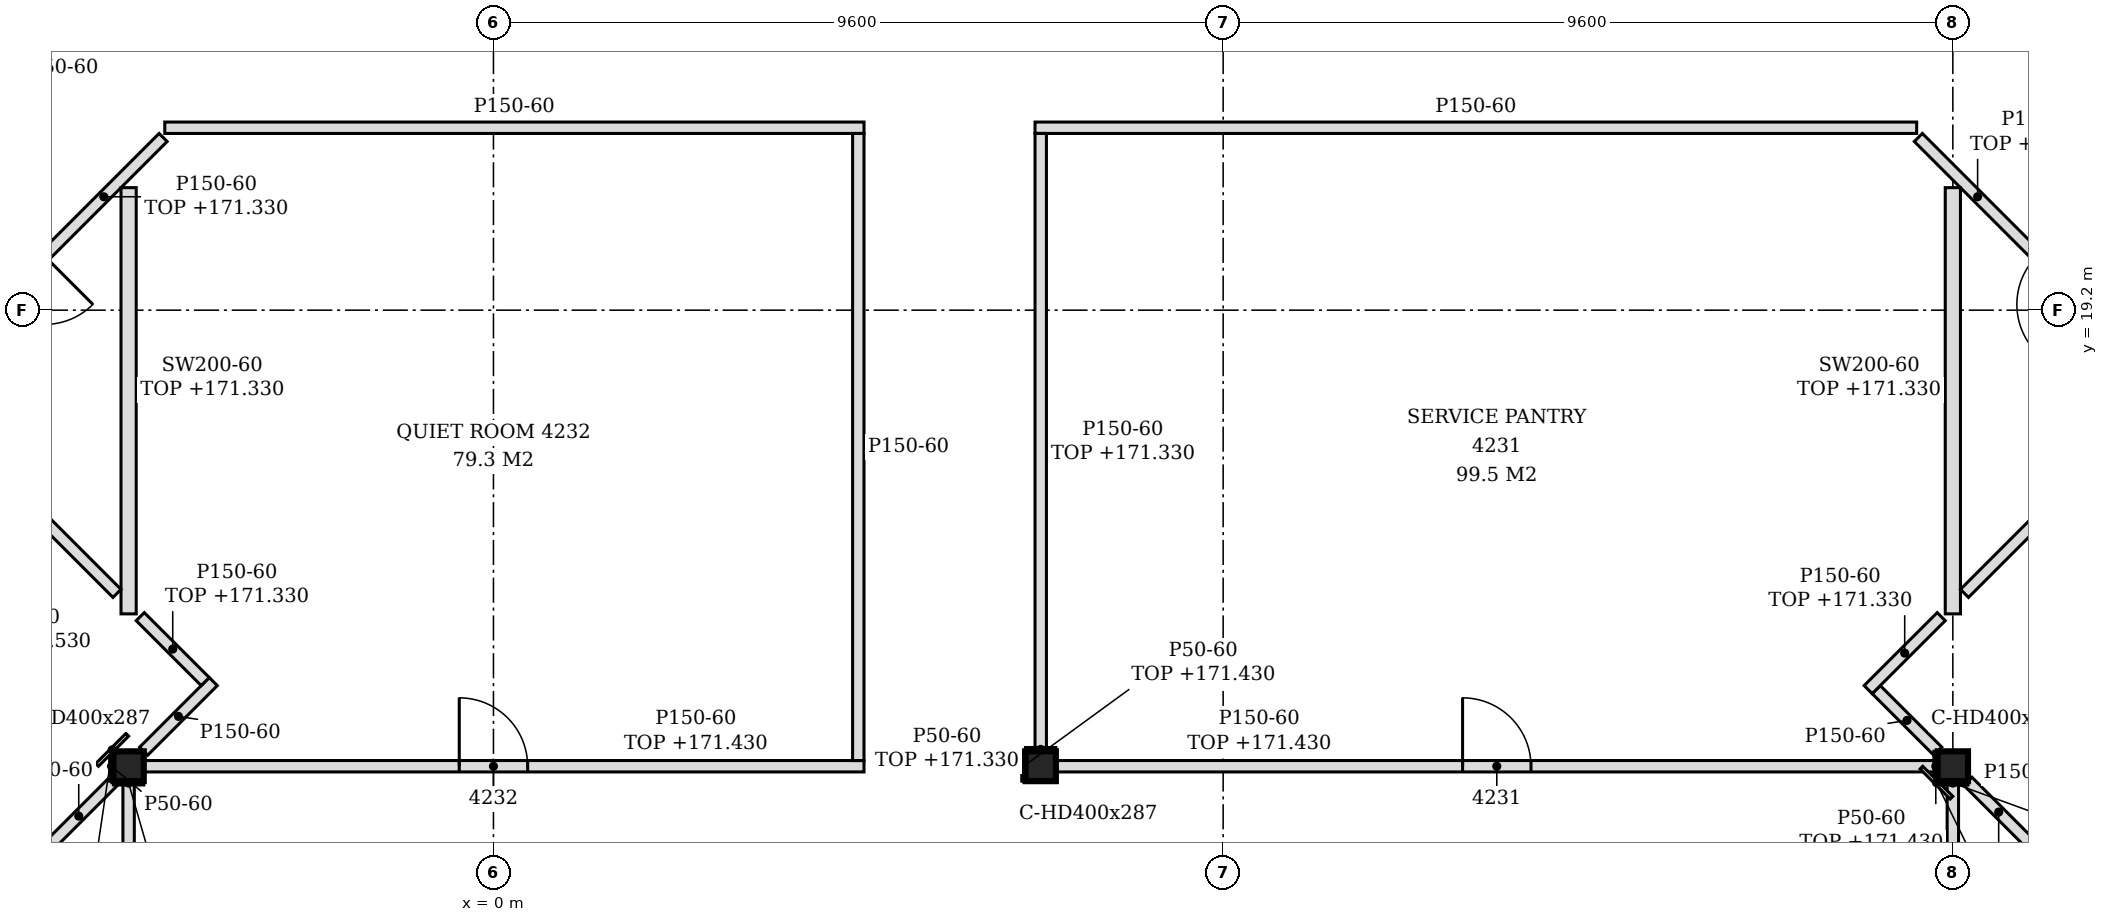
"""IFC4 building model, lengths in metres.
Left out: names, types, materials, properties, quantities, classifications, styles, units other than length and angle.
Written with IfcOpenShell. Run it as: python <this file> out.ifc"""

import sys

from ifc_helpers import new_model, si_unit, direction, frame, frame_2d, origin, origin_2d, place, context, subcontext, project, spatial, polyline, rectangle, i_section, outline, extrude, element, fill, save


model = new_model("IFC4")
c1 = context("Model", 3, precision=1e-05, world=origin(), true_north=direction((0.0, 1.0)))
c2 = subcontext(c1, "Body", "Model", "MODEL_VIEW")
j1 = project(units=[si_unit("LENGTHUNIT", "METRE"), si_unit("PLANEANGLEUNIT", "RADIAN")], contexts=[c1])
p1 = place(None, origin())
s1 = spatial("IfcSite", under=j1, at=p1, CompositionType="ELEMENT")
p2 = place(p1, origin())
s2 = spatial("IfcBuilding", under=s1, at=p2, CompositionType="ELEMENT")
p3 = place(p2, frame((0.0, 0.0, 168.6)))
s3 = spatial("IfcBuildingStorey", under=s2, at=p3, CompositionType="ELEMENT", Elevation=168.6)
for number, where, z_axis, x_axis in (
    (1, (-4.8, 13.2, -0.15), (0.0, 0.0, 1.0), (1.0, 0.0, 0.0)),
    (2, (7.2, 13.2, -0.15), (0.0, 0.0, 1.0), (1.0, 0.0, 0.0)),
    (3, (19.2, 13.2, -0.15), (0.0, 0.0, 1.0), (1.0, 0.0, 0.0)),
):
    element("IfcColumn", number, at=place(p3, frame(where, z_axis=z_axis, x_axis=x_axis)), inside=s3, PredefinedType="COLUMN", context=c2, shape_type="SweptSolid", body=[
        extrude(i_section(OverallWidth=0.399, OverallDepth=0.393, WebThickness=0.023, FlangeThickness=0.037, FilletRadius=0.015, at=origin_2d()), origin(), (0.0, 0.0, 1.0), 3.6),
    ])
p4 = place(p3, frame((-4.8, 2.596, 0.0), z_axis=(0.0, 0.0, 1.0), x_axis=(0.0, 1.0, 0.0)))
e4 = element("IfcWall", 4, at=p4, inside=s3, PredefinedType="PARTITIONING", context=c2, shape_type="SweptSolid", body=[
    extrude(rectangle(XDim=10.407, YDim=0.15, at=frame_2d((5.204, 0.0))), origin(), (0.0, 0.0, 1.0), 2.83),
])
p5 = place(p4, frame((4.303, 0.0, 0.0)))
e5 = element("IfcOpeningElement", 5, at=p5, cuts=e4, PredefinedType="OPENING", context=c2, shape_type="SweptSolid", body=[
    extrude(rectangle(XDim=0.9, YDim=2.1, at=frame_2d((0.45, 1.05))), frame((0.0, 0.085, 0.0), z_axis=(0.0, -1.0, 0.0), x_axis=(1.0, 0.0, 0.0)), (0.0, 0.0, 1.0), 0.17),
])
p6 = place(p3, frame((19.2, 2.596, 0.0), z_axis=(0.0, 0.0, 1.0), x_axis=(0.0, 1.0, 0.0)))
e6 = element("IfcWall", 6, at=p6, inside=s3, PredefinedType="PARTITIONING", context=c2, shape_type="SweptSolid", body=[
    extrude(rectangle(XDim=10.407, YDim=0.15, at=frame_2d((5.204, 0.0))), origin(), (0.0, 0.0, 1.0), 2.83),
])
p7 = place(p6, frame((2.954, 0.0, 0.0)))
e7 = element("IfcOpeningElement", 7, at=p7, cuts=e6, PredefinedType="OPENING", context=c2, shape_type="SweptSolid", body=[
    extrude(rectangle(XDim=0.9, YDim=2.1, at=frame_2d((0.45, 1.05))), frame((0.0, 0.085, 0.0), z_axis=(0.0, -1.0, 0.0), x_axis=(1.0, 0.0, 0.0)), (0.0, 0.0, 1.0), 0.17),
])
p8 = place(p3, frame((-5.914, 12.086, 0.0), z_axis=(0.0, 0.0, 1.0), x_axis=(0.707106781187, 0.707106781187, 0.0)))
e8 = element("IfcWall", 8, at=p8, inside=s3, PredefinedType="PARTITIONING", context=c2, shape_type="SweptSolid", body=[
    extrude(rectangle(XDim=1.295, YDim=0.15, at=frame_2d((0.648, 0.0))), origin(), (0.0, 0.0, 1.0), 3.45),
])
p9 = place(p3, frame((20.208, 12.086, 0.0), z_axis=(0.0, 0.0, 1.0), x_axis=(0.706747296365, 0.707466083343, 0.0)))
e9 = element("IfcWall", 9, at=p9, inside=s3, PredefinedType="PARTITIONING", context=c2, shape_type="SweptSolid", body=[
    extrude(rectangle(XDim=1.359, YDim=0.15, at=frame_2d((0.679, 0.0))), origin(), (0.0, 0.0, 1.0), 3.45),
])
p10 = place(p3, frame((20.208, 12.192, 0.0), z_axis=(0.0, 0.0, 1.0), x_axis=(-0.70721334539, 0.707000200921, 0.0)))
e10 = element("IfcWall", 10, at=p10, inside=s3, PredefinedType="PARTITIONING", context=c2, shape_type="SweptSolid", body=[
    extrude(rectangle(XDim=1.146, YDim=0.15, at=frame_2d((0.573, 0.0))), origin(), (0.0, 0.0, 1.0), 3.45),
])
p11 = place(p3, frame((-4.601, 13.2, 0.0), z_axis=(0.0, 0.0, 1.0), x_axis=(1.0, 0.0, 0.0)))
e11 = element("IfcWall", 11, at=p11, inside=s3, PredefinedType="PARTITIONING", context=c2, shape_type="SweptSolid", body=[
    extrude(rectangle(XDim=9.476, YDim=0.15, at=frame_2d((4.738, 0.0))), origin(), (0.0, 0.0, 1.0), 2.83),
])
p12 = place(p11, frame((4.151, 0.0, 0.0)))
e12 = element("IfcOpeningElement", 12, at=p12, cuts=e11, PredefinedType="OPENING", context=c2, shape_type="SweptSolid", body=[
    extrude(rectangle(XDim=0.9, YDim=2.1, at=frame_2d((0.45, 1.05))), frame((0.0, 0.085, 0.0), z_axis=(0.0, -1.0, 0.0), x_axis=(1.0, 0.0, 0.0)), (0.0, 0.0, 1.0), 0.17),
])
p13 = place(p3, frame((7.399, 13.2, 0.0), z_axis=(0.0, 0.0, 1.0), x_axis=(1.0, 0.0, 0.0)))
e13 = element("IfcWall", 13, at=p13, inside=s3, PredefinedType="PARTITIONING", context=c2, shape_type="SweptSolid", body=[
    extrude(rectangle(XDim=11.601, YDim=0.15, at=frame_2d((5.801, 0.0))), origin(), (0.0, 0.0, 1.0), 2.83),
])
p14 = place(p13, frame((5.351, 0.0, 0.0)))
e14 = element("IfcOpeningElement", 14, at=p14, cuts=e13, PredefinedType="OPENING", context=c2, shape_type="SweptSolid", body=[
    extrude(rectangle(XDim=0.9, YDim=2.1, at=frame_2d((0.45, 1.05))), frame((0.0, 0.085, 0.0), z_axis=(0.0, -1.0, 0.0), x_axis=(1.0, 0.0, 0.0)), (0.0, 0.0, 1.0), 0.17),
])
p15 = place(p3, frame((4.8, 13.275, 0.0), z_axis=(0.0, 0.0, 1.0), x_axis=(0.0, 1.0, 0.0)))
e15 = element("IfcWall", 15, at=p15, inside=s3, PredefinedType="PARTITIONING", context=c2, shape_type="SweptSolid", body=[
    extrude(outline(polyline([(0.0, 0.0), (8.25, 0.0), (8.25, 3.45), (6.03, 3.45), (6.028, 2.88), (5.82, 2.88), (5.818, 3.45), (0.075, 3.45), (0.073, 2.83), (0.0, 2.83), (0.0, 0.0)])), frame((0.0, 0.075, 0.0), z_axis=(0.0, -1.0, 0.0), x_axis=(1.0, 0.0, 0.0)), (0.0, 0.0, 1.0), 0.15),
])
p16 = place(p3, frame((-4.602, 13.398, 0.0), z_axis=(0.0, 0.0, 1.0), x_axis=(0.707106781187, 0.707106781187, 0.0)))
e16 = element("IfcWall", 16, at=p16, inside=s3, PredefinedType="PARTITIONING", context=c2, shape_type="SweptSolid", body=[
    extrude(rectangle(XDim=1.296, YDim=0.15, at=frame_2d((0.648, 0.0))), origin(), (0.0, 0.0, 1.0), 3.45),
])
p17 = place(p3, frame((7.2, 13.396, 0.0), z_axis=(0.0, 0.0, 1.0), x_axis=(0.0, 1.0, 0.0)))
e17 = element("IfcWall", 17, at=p17, inside=s3, PredefinedType="PARTITIONING", context=c2, shape_type="SweptSolid", body=[
    extrude(rectangle(XDim=8.128, YDim=0.15, at=frame_2d((4.064, 0.0))), origin(), (0.0, 0.0, 1.0), 2.73),
])
p18 = place(p3, frame((19.002, 13.398, 0.0), z_axis=(0.0, 0.0, 1.0), x_axis=(-0.707000200921, 0.70721334539, 0.0)))
e18 = element("IfcWall", 18, at=p18, inside=s3, PredefinedType="PARTITIONING", context=c2, shape_type="SweptSolid", body=[
    extrude(rectangle(XDim=1.146, YDim=0.15, at=frame_2d((0.573, 0.0))), origin(), (0.0, 0.0, 1.0), 3.45),
])
p19 = place(p3, frame((18.086, 14.208, 0.0), z_axis=(0.0, 0.0, 1.0), x_axis=(0.707466083343, 0.706747296365, 0.0)))
e19 = element("IfcWall", 19, at=p19, inside=s3, PredefinedType="PARTITIONING", context=c2, shape_type="SweptSolid", body=[
    extrude(rectangle(XDim=1.359, YDim=0.15, at=frame_2d((0.679, 0.0))), origin(), (0.0, 0.0, 1.0), 2.73),
])
p20 = place(p3, frame((-3.792, 14.314, 0.0), z_axis=(0.0, 0.0, 1.0), x_axis=(-0.707409718716, 0.706803713817, 0.0)))
e20 = element("IfcWall", 20, at=p20, inside=s3, PredefinedType="PARTITIONING", context=c2, shape_type="SweptSolid", body=[
    extrude(rectangle(XDim=1.208, YDim=0.15, at=frame_2d((0.604, 0.0))), origin(), (0.0, 0.0, 1.0), 2.73),
])
for number, where, z_axis, x_axis in (
    (21, (-4.8, 15.205, 0.0), (0.0, 0.0, 1.0), (0.0, 1.0, 0.0)),
    (22, (19.2, 15.205, 0.0), (0.0, 0.0, 1.0), (0.0, 1.0, 0.0)),
):
    element("IfcWall", number, at=place(p3, frame(where, z_axis=z_axis, x_axis=x_axis)), inside=s3, PredefinedType="PARTITIONING", context=c2, shape_type="SweptSolid", body=[
        extrude(rectangle(XDim=5.607, YDim=0.2, at=frame_2d((2.804, 0.0))), origin(), (0.0, 0.0, 1.0), 2.73),
    ])
p21 = place(p3, frame((-4.953, 15.474, 0.0), z_axis=(0.0, 0.0, 1.0), x_axis=(-0.707008778354, 0.707204770438, 0.0)))
e23 = element("IfcWall", 23, at=p21, inside=s3, PredefinedType="PARTITIONING", context=c2, shape_type="SweptSolid", body=[
    extrude(rectangle(XDim=3.737, YDim=0.15, at=frame_2d((1.869, 0.0))), origin(), (0.0, 0.0, 1.0), 2.73),
])
p22 = place(p3, frame((19.353, 15.474, 0.0), z_axis=(0.0, 0.0, 1.0), x_axis=(0.707012556818, 0.707200993001, 0.0)))
e24 = element("IfcWall", 24, at=p22, inside=s3, PredefinedType="PARTITIONING", context=c2, shape_type="SweptSolid", body=[
    extrude(rectangle(XDim=3.887, YDim=0.15, at=frame_2d((1.943, 0.0))), origin(), (0.0, 0.0, 1.0), 2.73),
])
p23 = place(p3, frame((-7.701, 18.117, 0.0), z_axis=(0.0, 0.0, 1.0), x_axis=(0.707106781187, 0.707106781187, 0.0)))
e25 = element("IfcWall", 25, at=p23, inside=s3, PredefinedType="PARTITIONING", context=c2, shape_type="SweptSolid", body=[
    extrude(rectangle(XDim=4.745, YDim=0.15, at=frame_2d((2.372, 0.0))), origin(), (0.0, 0.0, 1.0), 2.73),
])
p24 = place(p23, frame((1.639, 0.0, 0.0)))
e26 = element("IfcOpeningElement", 26, at=p24, cuts=e25, PredefinedType="OPENING", context=c2, shape_type="SweptSolid", body=[
    extrude(rectangle(XDim=0.9, YDim=2.1, at=frame_2d((0.45, 1.05))), frame((0.0, 0.085, 0.0), z_axis=(0.0, -1.0, 0.0), x_axis=(1.0, 0.0, 0.0)), (0.0, 0.0, 1.0), 0.17),
])
p25 = place(p3, frame((21.995, 18.223, 0.0), z_axis=(0.0, 0.0, 1.0), x_axis=(-0.707106781187, 0.707106781187, 0.0)))
e27 = element("IfcWall", 27, at=p25, inside=s3, PredefinedType="PARTITIONING", context=c2, shape_type="SweptSolid", body=[
    extrude(rectangle(XDim=4.595, YDim=0.15, at=frame_2d((2.297, 0.0))), origin(), (0.0, 0.0, 1.0), 2.73),
])
p26 = place(p25, frame((1.489, 0.0, 0.0)))
e28 = element("IfcOpeningElement", 28, at=p26, cuts=e27, PredefinedType="OPENING", context=c2, shape_type="SweptSolid", body=[
    extrude(rectangle(XDim=0.9, YDim=2.1, at=frame_2d((0.45, 1.05))), frame((0.0, 0.085, 0.0), z_axis=(0.0, -1.0, 0.0), x_axis=(1.0, 0.0, 0.0)), (0.0, 0.0, 1.0), 0.17),
])
p27 = place(p3, frame((-8.623, 20.589, 0.0), z_axis=(0.0, 0.0, 1.0), x_axis=(0.707106781187, 0.707106781187, 0.0)))
e29 = element("IfcWall", 29, at=p27, inside=s3, PredefinedType="PARTITIONING", context=c2, shape_type="SweptSolid", body=[
    extrude(rectangle(XDim=4.643, YDim=0.15, at=frame_2d((2.322, 0.0))), origin(), (0.0, 0.0, 1.0), 3.45),
])
p28 = place(p27, frame((1.085, 0.0, 0.0)))
e30 = element("IfcOpeningElement", 30, at=p28, cuts=e29, PredefinedType="OPENING", context=c2, shape_type="SweptSolid", body=[
    extrude(rectangle(XDim=0.9, YDim=2.1, at=frame_2d((0.45, 1.05))), frame((0.0, 0.085, 0.0), z_axis=(0.0, -1.0, 0.0), x_axis=(1.0, 0.0, 0.0)), (0.0, 0.0, 1.0), 0.17),
])
p29 = place(p3, frame((23.023, 20.589, 0.0), z_axis=(0.0, 0.0, 1.0), x_axis=(-0.707106781187, 0.707106781187, 0.0)))
e31 = element("IfcWall", 31, at=p29, inside=s3, PredefinedType="PARTITIONING", context=c2, shape_type="SweptSolid", body=[
    extrude(rectangle(XDim=4.643, YDim=0.15, at=frame_2d((2.322, 0.0))), origin(), (0.0, 0.0, 1.0), 3.45),
])
p30 = place(p3, frame((-4.324, 21.6, 0.0), z_axis=(0.0, 0.0, 1.0), x_axis=(1.0, 0.0, 0.0)))
e32 = element("IfcWall", 32, at=p30, inside=s3, PredefinedType="PARTITIONING", context=c2, shape_type="SweptSolid", body=[
    extrude(rectangle(XDim=9.199, YDim=0.15, at=frame_2d((4.6, 0.0))), origin(), (0.0, 0.0, 1.0), 3.45),
])
p31 = place(p3, frame((7.125, 21.6, 0.0), z_axis=(0.0, 0.0, 1.0), x_axis=(1.0, 0.0, 0.0)))
e33 = element("IfcWall", 33, at=p31, inside=s3, PredefinedType="PARTITIONING", context=c2, shape_type="SweptSolid", body=[
    extrude(outline(polyline([(0.0, 0.0), (11.599, 0.0), (11.599, 3.45), (0.225, 3.45), (0.223, 2.73), (0.0, 2.73), (0.0, 0.0)])), frame((0.0, 0.075, 0.0), z_axis=(0.0, -1.0, 0.0), x_axis=(1.0, 0.0, 0.0)), (0.0, 0.0, 1.0), 0.15),
])
p32 = place(p3, frame((-5.024, 13.003, 0.0), z_axis=(0.0, 0.0, 1.0), x_axis=(0.0, 1.0, 0.0)))
e34 = element("IfcWall", 34, at=p32, inside=s3, PredefinedType="PARTITIONING", context=c2, shape_type="SweptSolid", body=[
    extrude(rectangle(XDim=0.393, YDim=0.05, at=frame_2d((0.197, 0.0))), origin(), (0.0, 0.0, 1.0), 3.45),
])
p33 = place(p3, frame((18.976, 13.003, 0.0), z_axis=(0.0, 0.0, 1.0), x_axis=(0.0, 1.0, 0.0)))
e35 = element("IfcWall", 35, at=p33, inside=s3, PredefinedType="PARTITIONING", context=c2, shape_type="SweptSolid", body=[
    extrude(rectangle(XDim=0.393, YDim=0.05, at=frame_2d((0.197, 0.0))), origin(), (0.0, 0.0, 1.0), 2.83),
])
p34 = place(p3, frame((-5.214, 13.218, 0.0), z_axis=(0.0, 0.0, 1.0), x_axis=(0.707106781187, 0.707106781187, 0.0)))
e36 = element("IfcWall", 36, at=p34, inside=s3, PredefinedType="PARTITIONING", context=c2, shape_type="SweptSolid", body=[
    extrude(rectangle(XDim=0.56, YDim=0.05, at=frame_2d((0.28, 0.0))), origin(), (0.0, 0.0, 1.0), 2.73),
])
p35 = place(p3, frame((19.182, 12.786, 0.0), z_axis=(0.0, 0.0, 1.0), x_axis=(-0.707106781187, 0.707106781187, 0.0)))
e37 = element("IfcWall", 37, at=p35, inside=s3, PredefinedType="PARTITIONING", context=c2, shape_type="SweptSolid", body=[
    extrude(rectangle(XDim=0.56, YDim=0.05, at=frame_2d((0.28, 0.0))), origin(), (0.0, 0.0, 1.0), 2.83),
])
p36 = place(p3, frame((-5.0, 12.979, 0.0), z_axis=(0.0, 0.0, 1.0), x_axis=(1.0, 0.0, 0.0)))
e38 = element("IfcWall", 38, at=p36, inside=s3, PredefinedType="PARTITIONING", context=c2, shape_type="SweptSolid", body=[
    extrude(rectangle(XDim=0.399, YDim=0.05, at=frame_2d((0.199, 0.0))), origin(), (0.0, 0.0, 1.0), 2.83),
])
p37 = place(p3, frame((7.0, 13.421, 0.0), z_axis=(0.0, 0.0, 1.0), x_axis=(1.0, 0.0, 0.0)))
e39 = element("IfcWall", 39, at=p37, inside=s3, PredefinedType="PARTITIONING", context=c2, shape_type="SweptSolid", body=[
    extrude(rectangle(XDim=0.399, YDim=0.05, at=frame_2d((0.199, 0.0))), origin(), (0.0, 0.0, 1.0), 2.73),
])
p38 = place(p3, frame((19.0, 12.979, 0.0), z_axis=(0.0, 0.0, 1.0), x_axis=(1.0, 0.0, 0.0)))
e40 = element("IfcWall", 40, at=p38, inside=s3, PredefinedType="PARTITIONING", context=c2, shape_type="SweptSolid", body=[
    extrude(rectangle(XDim=0.399, YDim=0.05, at=frame_2d((0.199, 0.0))), origin(), (0.0, 0.0, 1.0), 2.83),
])
p39 = place(p3, frame((6.976, 13.003, 0.0), z_axis=(0.0, 0.0, 1.0), x_axis=(0.0, 1.0, 0.0)))
e41 = element("IfcWall", 41, at=p39, inside=s3, PredefinedType="PARTITIONING", context=c2, shape_type="SweptSolid", body=[
    extrude(rectangle(XDim=0.393, YDim=0.05, at=frame_2d((0.197, 0.0))), origin(), (0.0, 0.0, 1.0), 2.83),
])
p40 = place(p14, origin())
e42 = element("IfcDoor", 42, at=p40, inside=s3, OperationType="SINGLE_SWING_LEFT", PredefinedType="DOOR", context=c2, shape_type="SweptSolid", body=[
    extrude(rectangle(XDim=0.9, YDim=2.1, at=frame_2d((0.45, 1.05))), frame((0.0, 0.025, 0.0), z_axis=(0.0, -1.0, 0.0), x_axis=(1.0, 0.0, 0.0)), (0.0, 0.0, 1.0), 0.05),
])
fill(e14, e42)
p41 = place(p12, origin())
e43 = element("IfcDoor", 43, at=p41, inside=s3, OperationType="SINGLE_SWING_LEFT", PredefinedType="DOOR", context=c2, shape_type="SweptSolid", body=[
    extrude(rectangle(XDim=0.9, YDim=2.1, at=frame_2d((0.45, 1.05))), frame((0.0, 0.025, 0.0), z_axis=(0.0, -1.0, 0.0), x_axis=(1.0, 0.0, 0.0)), (0.0, 0.0, 1.0), 0.05),
])
fill(e12, e43)
save(model, sys.argv[1])
